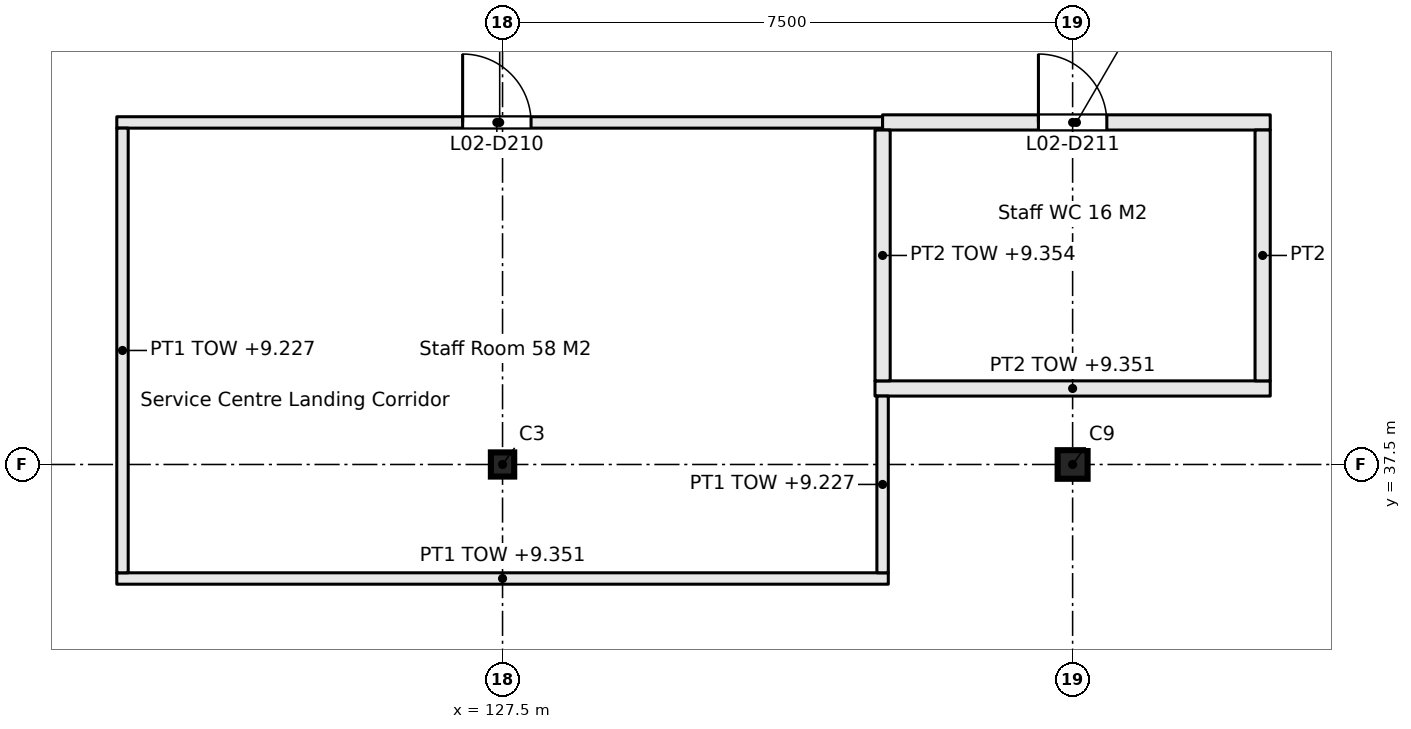
"""IFC4 building model, lengths in metres.
Left out: names, types, materials, properties, quantities, classifications, styles, units other than length and angle.
Written with IfcOpenShell. Run it as: python <this file> out.ifc"""

import sys

from ifc_helpers import new_model, si_unit, direction, frame, frame_2d, origin, origin_2d, place, context, subcontext, project, spatial, rectangle, i_section, extrude, element, fill, save


model = new_model("IFC4")
c1 = context("Model", 3, precision=1e-05, world=origin(), true_north=direction((0.0, 1.0)))
c2 = subcontext(c1, "Body", "Model", "MODEL_VIEW")
j1 = project(units=[si_unit("LENGTHUNIT", "METRE"), si_unit("PLANEANGLEUNIT", "RADIAN")], contexts=[c1])
p1 = place(None, origin())
s1 = spatial("IfcSite", under=j1, at=p1, CompositionType="ELEMENT")
p2 = place(p1, origin())
s2 = spatial("IfcBuilding", under=s1, at=p2, CompositionType="ELEMENT")
p3 = place(p2, frame((0.0, 0.0, 6.6)))
s3 = spatial("IfcBuildingStorey", under=s2, at=p3, CompositionType="ELEMENT", Elevation=6.6)
p4 = place(p3, frame((127.5, 37.5, 0.0), z_axis=(0.0, 0.0, 1.0), x_axis=(1.0, 0.0, 0.0)))
e1 = element("IfcColumn", 1, at=p4, inside=s3, PredefinedType="COLUMN", context=c2, shape_type="SweptSolid", body=[
    extrude(i_section(OverallWidth=0.307, OverallDepth=0.318, WebThickness=0.013, FlangeThickness=0.021, FilletRadius=0.015, at=origin_2d()), origin(), (0.0, 0.0, 1.0), 3.3),
])
p5 = place(p3, frame((135.0, 37.5, 0.0), z_axis=(0.0, 0.0, 1.0), x_axis=(1.0, 0.0, 0.0)))
e2 = element("IfcColumn", 2, at=p5, inside=s3, PredefinedType="COLUMN", context=c2, shape_type="SweptSolid", body=[
    extrude(i_section(OverallWidth=0.394, OverallDepth=0.376, WebThickness=0.017, FlangeThickness=0.028, FilletRadius=0.015, at=origin_2d()), origin(), (0.0, 0.0, 1.0), 3.3),
])
p6 = place(p3, frame((122.425, 36.0, 0.0), z_axis=(0.0, 0.0, 1.0), x_axis=(1.0, 0.0, 0.0)))
e3 = element("IfcWall", 3, at=p6, inside=s3, PredefinedType="PARTITIONING", context=c2, shape_type="SweptSolid", body=[
    extrude(rectangle(XDim=10.15, YDim=0.15, at=frame_2d((5.075, 0.0))), origin(), (0.0, 0.0, 1.0), 2.751),
])
p7 = place(p3, frame((132.4, 38.5, 0.0), z_axis=(0.0, 0.0, 1.0), x_axis=(1.0, 0.0, 0.0)))
e4 = element("IfcWall", 4, at=p7, inside=s3, PredefinedType="PARTITIONING", context=c2, shape_type="SweptSolid", body=[
    extrude(rectangle(XDim=5.2, YDim=0.2, at=frame_2d((2.6, 0.0))), origin(), (0.0, 0.0, 1.0), 2.751),
])
p8 = place(p3, frame((122.425, 42.0, 0.0), z_axis=(0.0, 0.0, 1.0), x_axis=(1.0, 0.0, 0.0)))
e5 = element("IfcWall", 5, at=p8, inside=s3, PredefinedType="PARTITIONING", context=c2, shape_type="SweptSolid", body=[
    extrude(rectangle(XDim=10.075, YDim=0.15, at=frame_2d((5.038, 0.0))), origin(), (0.0, 0.0, 1.0), 2.751),
])
p9 = place(p8, frame((4.55, 0.0, 0.0)))
e6 = element("IfcOpeningElement", 6, at=p9, cuts=e5, PredefinedType="OPENING", context=c2, shape_type="SweptSolid", body=[
    extrude(rectangle(XDim=0.9, YDim=2.1, at=frame_2d((0.45, 1.05))), frame((0.0, 0.085, 0.0), z_axis=(0.0, -1.0, 0.0), x_axis=(1.0, 0.0, 0.0)), (0.0, 0.0, 1.0), 0.17),
])
p10 = place(p3, frame((132.5, 42.0, 0.0), z_axis=(0.0, 0.0, 1.0), x_axis=(1.0, 0.0, 0.0)))
e7 = element("IfcWall", 7, at=p10, inside=s3, PredefinedType="PARTITIONING", context=c2, shape_type="SweptSolid", body=[
    extrude(rectangle(XDim=5.1, YDim=0.2, at=frame_2d((2.55, 0.0))), origin(), (0.0, 0.0, 1.0), 2.751),
])
p11 = place(p10, frame((2.05, 0.0, 0.0)))
e8 = element("IfcOpeningElement", 8, at=p11, cuts=e7, PredefinedType="OPENING", context=c2, shape_type="SweptSolid", body=[
    extrude(rectangle(XDim=0.9, YDim=2.1, at=frame_2d((0.45, 1.05))), frame((0.0, 0.11, 0.0), z_axis=(0.0, -1.0, 0.0), x_axis=(1.0, 0.0, 0.0)), (0.0, 0.0, 1.0), 0.22),
])
p12 = place(p3, frame((122.5, 36.075, 0.0), z_axis=(0.0, 0.0, 1.0), x_axis=(0.0, 1.0, 0.0)))
e9 = element("IfcWall", 9, at=p12, inside=s3, PredefinedType="PARTITIONING", context=c2, shape_type="SweptSolid", body=[
    extrude(rectangle(XDim=5.85, YDim=0.15, at=frame_2d((2.925, 0.0))), origin(), (0.0, 0.0, 1.0), 2.627),
])
p13 = place(p3, frame((132.5, 36.075, 0.0), z_axis=(0.0, 0.0, 1.0), x_axis=(0.0, 1.0, 0.0)))
e10 = element("IfcWall", 10, at=p13, inside=s3, PredefinedType="PARTITIONING", context=c2, shape_type="SweptSolid", body=[
    extrude(rectangle(XDim=2.325, YDim=0.15, at=frame_2d((1.163, 0.0))), origin(), (0.0, 0.0, 1.0), 2.627),
])
for number, where, z_axis, x_axis in (
    (11, (132.5, 38.6, 0.0), (0.0, 0.0, 1.0), (0.0, 1.0, 0.0)),
    (12, (137.5, 38.6, 0.0), (0.0, 0.0, 1.0), (0.0, 1.0, 0.0)),
):
    element("IfcWall", number, at=place(p3, frame(where, z_axis=z_axis, x_axis=x_axis)), inside=s3, PredefinedType="PARTITIONING", context=c2, shape_type="SweptSolid", body=[
        extrude(rectangle(XDim=3.3, YDim=0.2, at=frame_2d((1.65, 0.0))), origin(), (0.0, 0.0, 1.0), 2.754),
    ])
p14 = place(p9, origin())
e13 = element("IfcDoor", 13, at=p14, inside=s3, OperationType="SINGLE_SWING_LEFT", PredefinedType="DOOR", context=c2, shape_type="SweptSolid", body=[
    extrude(rectangle(XDim=0.9, YDim=2.1, at=frame_2d((0.45, 1.05))), frame((0.0, 0.025, 0.0), z_axis=(0.0, -1.0, 0.0), x_axis=(1.0, 0.0, 0.0)), (0.0, 0.0, 1.0), 0.05),
])
fill(e6, e13)
p15 = place(p11, origin())
e14 = element("IfcDoor", 14, at=p15, inside=s3, OperationType="SINGLE_SWING_LEFT", PredefinedType="DOOR", context=c2, shape_type="SweptSolid", body=[
    extrude(rectangle(XDim=0.9, YDim=2.1, at=frame_2d((0.45, 1.05))), frame((0.0, 0.025, 0.0), z_axis=(0.0, -1.0, 0.0), x_axis=(1.0, 0.0, 0.0)), (0.0, 0.0, 1.0), 0.05),
])
fill(e8, e14)
save(model, sys.argv[1])
